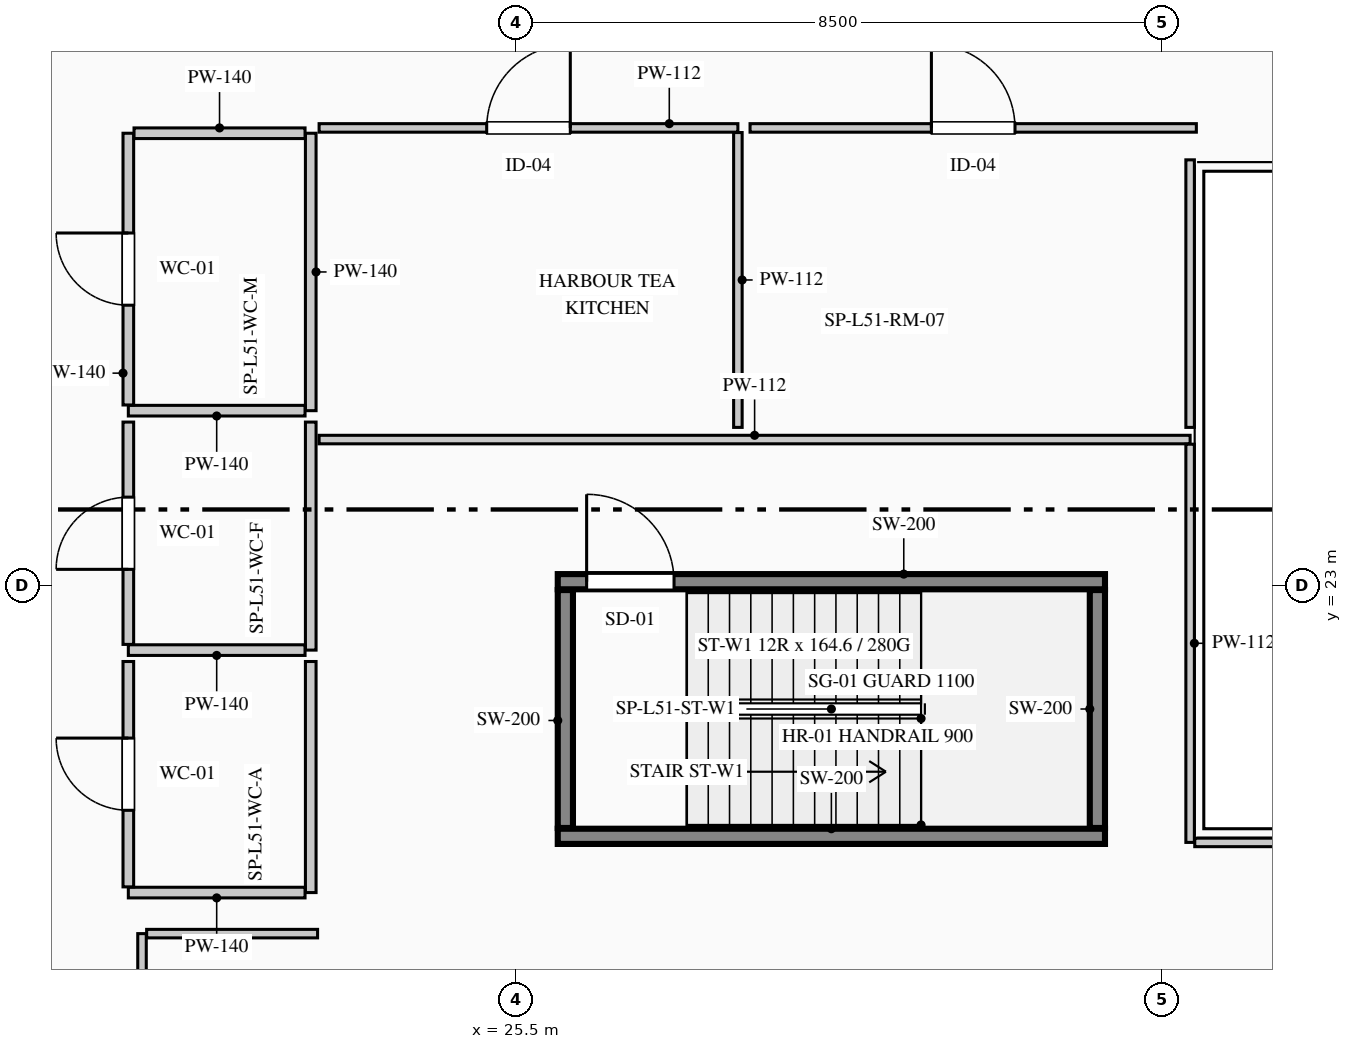
"""IFC4 building model, lengths in metres.
Left out: names, types, materials, properties, quantities, classifications, styles, units other than length and angle.
Written with IfcOpenShell. Run it as: python <this file> out.ifc"""

import sys

from ifc_helpers import new_model, si_unit, direction, frame, frame_2d, origin, place, context, subcontext, project, spatial, rectangle, extrude, element, fill, save


model = new_model("IFC4")
c1 = context("Model", 3, precision=1e-05, world=origin(), true_north=direction((0.0, 1.0)))
c2 = subcontext(c1, "Body", "Model", "MODEL_VIEW")
j1 = project(units=[si_unit("LENGTHUNIT", "METRE"), si_unit("PLANEANGLEUNIT", "RADIAN")], contexts=[c1])
p1 = place(None, origin())
s1 = spatial("IfcSite", under=j1, at=p1, CompositionType="ELEMENT")
p2 = place(p1, origin())
s2 = spatial("IfcBuilding", under=s1, at=p2, CompositionType="ELEMENT")
p3 = place(p2, frame((0.0, 0.0, 215.35)))
s3 = spatial("IfcBuildingStorey", under=s2, at=p3, CompositionType="ELEMENT", Elevation=215.35)
p4 = place(p3, frame((26.05, 19.7, 0.0), z_axis=(0.0, 0.0, 1.0), x_axis=(1.0, 0.0, 0.0)))
e1 = element("IfcWall", 1, at=p4, inside=s3, PredefinedType="SHEAR", context=c2, shape_type="SweptSolid", body=[
    extrude(rectangle(XDim=7.2, YDim=0.2, at=frame_2d((3.6, 0.0))), origin(), (0.0, 0.0, 1.0), 3.95),
])
p5 = place(p3, frame((26.05, 23.05, 0.0), z_axis=(0.0, 0.0, 1.0), x_axis=(1.0, 0.0, 0.0)))
e2 = element("IfcWall", 2, at=p5, inside=s3, PredefinedType="SHEAR", context=c2, shape_type="SweptSolid", body=[
    extrude(rectangle(XDim=7.2, YDim=0.2, at=frame_2d((3.6, 0.0))), origin(), (0.0, 0.0, 1.0), 3.95),
])
p6 = place(p5, frame((0.38, 0.0, 0.0)))
e3 = element("IfcOpeningElement", 3, at=p6, cuts=e2, PredefinedType="OPENING", context=c2, shape_type="SweptSolid", body=[
    extrude(rectangle(XDim=1.15, YDim=2.2, at=frame_2d((0.575, 1.1))), frame((0.0, 0.11, 0.0), z_axis=(0.0, -1.0, 0.0), x_axis=(1.0, 0.0, 0.0)), (0.0, 0.0, 1.0), 0.22),
])
for number, where, z_axis, x_axis in (
    (4, (26.15, 19.81, 0.0), (0.0, 0.0, 1.0), (0.0, 1.0, 0.0)),
    (5, (33.15, 19.81, 0.0), (0.0, 0.0, 1.0), (0.0, 1.0, 0.0)),
):
    element("IfcWall", number, at=place(p3, frame(where, z_axis=z_axis, x_axis=x_axis)), inside=s3, PredefinedType="SHEAR", context=c2, shape_type="SweptSolid", body=[
        extrude(rectangle(XDim=3.13, YDim=0.2, at=frame_2d((1.565, 0.0))), origin(), (0.0, 0.0, 1.0), 3.95),
    ])
p7 = place(p3, frame((22.8, 28.95, 0.0), z_axis=(0.0, 0.0, 1.0), x_axis=(0.0, -1.0, 0.0)))
e6 = element("IfcWall", 6, at=p7, inside=s3, PredefinedType="PARTITIONING", context=c2, shape_type="SweptSolid", body=[
    extrude(rectangle(XDim=3.65, YDim=0.14, at=frame_2d((1.825, 0.0))), origin(), (0.0, 0.0, 1.0), 3.325),
])
p8 = place(p3, frame((22.725, 25.3, 0.0), z_axis=(0.0, 0.0, 1.0), x_axis=(-1.0, 0.0, 0.0)))
e7 = element("IfcWall", 7, at=p8, inside=s3, PredefinedType="PARTITIONING", context=c2, shape_type="SweptSolid", body=[
    extrude(rectangle(XDim=2.325, YDim=0.14, at=frame_2d((1.163, 0.0))), origin(), (0.0, 0.0, 1.0), 3.7),
])
p9 = place(p3, frame((20.4, 25.375, 0.0), z_axis=(0.0, 0.0, 1.0), x_axis=(0.0, 1.0, 0.0)))
e8 = element("IfcWall", 8, at=p9, inside=s3, PredefinedType="PARTITIONING", context=c2, shape_type="SweptSolid", body=[
    extrude(rectangle(XDim=3.575, YDim=0.14, at=frame_2d((1.788, 0.0))), origin(), (0.0, 0.0, 1.0), 3.7),
])
p10 = place(p9, frame((1.312, 0.0, 0.0)))
e9 = element("IfcOpeningElement", 9, at=p10, cuts=e8, PredefinedType="OPENING", context=c2, shape_type="SweptSolid", body=[
    extrude(rectangle(XDim=0.95, YDim=2.15, at=frame_2d((0.475, 1.075))), frame((0.0, 0.08, 0.0), z_axis=(0.0, -1.0, 0.0), x_axis=(1.0, 0.0, 0.0)), (0.0, 0.0, 1.0), 0.16),
])
p11 = place(p3, frame((20.475, 28.95, 0.0), z_axis=(0.0, 0.0, 1.0), x_axis=(1.0, 0.0, 0.0)))
e10 = element("IfcWall", 10, at=p11, inside=s3, PredefinedType="PARTITIONING", context=c2, shape_type="SweptSolid", body=[
    extrude(rectangle(XDim=2.25, YDim=0.14, at=frame_2d((1.125, 0.0))), origin(), (0.0, 0.0, 1.0), 3.7),
])
p12 = place(p3, frame((22.8, 25.15, 0.0), z_axis=(0.0, 0.0, 1.0), x_axis=(0.0, -1.0, 0.0)))
e11 = element("IfcWall", 11, at=p12, inside=s3, PredefinedType="PARTITIONING", context=c2, shape_type="SweptSolid", body=[
    extrude(rectangle(XDim=3.0, YDim=0.14, at=frame_2d((1.5, 0.0))), origin(), (0.0, 0.0, 1.0), 3.325),
])
p13 = place(p3, frame((22.725, 22.15, 0.0), z_axis=(0.0, 0.0, 1.0), x_axis=(-1.0, 0.0, 0.0)))
e12 = element("IfcWall", 12, at=p13, inside=s3, PredefinedType="PARTITIONING", context=c2, shape_type="SweptSolid", body=[
    extrude(rectangle(XDim=2.325, YDim=0.14, at=frame_2d((1.163, 0.0))), origin(), (0.0, 0.0, 1.0), 3.7),
])
p14 = place(p3, frame((20.4, 22.225, 0.0), z_axis=(0.0, 0.0, 1.0), x_axis=(0.0, 1.0, 0.0)))
e13 = element("IfcWall", 13, at=p14, inside=s3, PredefinedType="PARTITIONING", context=c2, shape_type="SweptSolid", body=[
    extrude(rectangle(XDim=2.925, YDim=0.14, at=frame_2d((1.462, 0.0))), origin(), (0.0, 0.0, 1.0), 3.7),
])
p15 = place(p14, frame((0.988, 0.0, 0.0)))
e14 = element("IfcOpeningElement", 14, at=p15, cuts=e13, PredefinedType="OPENING", context=c2, shape_type="SweptSolid", body=[
    extrude(rectangle(XDim=0.95, YDim=2.15, at=frame_2d((0.475, 1.075))), frame((0.0, 0.08, 0.0), z_axis=(0.0, -1.0, 0.0), x_axis=(1.0, 0.0, 0.0)), (0.0, 0.0, 1.0), 0.16),
])
p16 = place(p3, frame((22.8, 22.0, 0.0), z_axis=(0.0, 0.0, 1.0), x_axis=(0.0, -1.0, 0.0)))
e15 = element("IfcWall", 15, at=p16, inside=s3, PredefinedType="PARTITIONING", context=c2, shape_type="SweptSolid", body=[
    extrude(rectangle(XDim=3.04, YDim=0.14, at=frame_2d((1.52, 0.0))), origin(), (0.0, 0.0, 1.0), 3.325),
])
p17 = place(p3, frame((22.725, 18.96, 0.0), z_axis=(0.0, 0.0, 1.0), x_axis=(-1.0, 0.0, 0.0)))
e16 = element("IfcWall", 16, at=p17, inside=s3, PredefinedType="PARTITIONING", context=c2, shape_type="SweptSolid", body=[
    extrude(rectangle(XDim=2.325, YDim=0.14, at=frame_2d((1.163, 0.0))), origin(), (0.0, 0.0, 1.0), 3.7),
])
p18 = place(p3, frame((20.4, 19.035, 0.0), z_axis=(0.0, 0.0, 1.0), x_axis=(0.0, 1.0, 0.0)))
e17 = element("IfcWall", 17, at=p18, inside=s3, PredefinedType="PARTITIONING", context=c2, shape_type="SweptSolid", body=[
    extrude(rectangle(XDim=2.965, YDim=0.14, at=frame_2d((1.482, 0.0))), origin(), (0.0, 0.0, 1.0), 3.7),
])
p19 = place(p18, frame((1.008, 0.0, 0.0)))
e18 = element("IfcOpeningElement", 18, at=p19, cuts=e17, PredefinedType="OPENING", context=c2, shape_type="SweptSolid", body=[
    extrude(rectangle(XDim=0.95, YDim=2.15, at=frame_2d((0.475, 1.075))), frame((0.0, 0.08, 0.0), z_axis=(0.0, -1.0, 0.0), x_axis=(1.0, 0.0, 0.0)), (0.0, 0.0, 1.0), 0.16),
])
p20 = place(p3, frame((20.58, 12.861, 0.0), z_axis=(0.0, 0.0, 1.0), x_axis=(0.0, 1.0, 0.0)))
e19 = element("IfcWall", 19, at=p20, inside=s3, PredefinedType="PARTITIONING", context=c2, shape_type="SweptSolid", body=[
    extrude(rectangle(XDim=5.559, YDim=0.112, at=frame_2d((2.779, 0.0))), origin(), (0.0, 0.0, 1.0), 3.7),
])
p21 = place(p20, frame((2.229, 0.0, 0.0)))
e20 = element("IfcOpeningElement", 20, at=p21, cuts=e19, PredefinedType="OPENING", context=c2, shape_type="SweptSolid", body=[
    extrude(rectangle(XDim=1.1, YDim=2.2, at=frame_2d((0.55, 1.1))), frame((0.0, 0.066, 0.0), z_axis=(0.0, -1.0, 0.0), x_axis=(1.0, 0.0, 0.0)), (0.0, 0.0, 1.0), 0.132),
])
p22 = place(p3, frame((20.641, 18.42, 0.0), z_axis=(0.0, 0.0, 1.0), x_axis=(1.0, 0.0, 0.0)))
e21 = element("IfcWall", 21, at=p22, inside=s3, PredefinedType="PARTITIONING", context=c2, shape_type="SweptSolid", body=[
    extrude(rectangle(XDim=2.249, YDim=0.112, at=frame_2d((1.125, 0.0))), origin(), (0.0, 0.0, 1.0), 3.7),
])
p23 = place(p3, frame((22.91, 24.92, 0.0), z_axis=(0.0, 0.0, 1.0), x_axis=(1.0, 0.0, 0.0)))
e22 = element("IfcWall", 22, at=p23, inside=s3, PredefinedType="PARTITIONING", context=c2, shape_type="SweptSolid", body=[
    extrude(rectangle(XDim=11.46, YDim=0.112, at=frame_2d((5.73, 0.0))), origin(), (0.0, 0.0, 1.0), 3.325),
])
p24 = place(p3, frame((34.37, 24.859, 0.0), z_axis=(0.0, 0.0, 1.0), x_axis=(0.0, -1.0, 0.0)))
e23 = element("IfcWall", 23, at=p24, inside=s3, PredefinedType="PARTITIONING", context=c2, shape_type="SweptSolid", body=[
    extrude(rectangle(XDim=5.239, YDim=0.112, at=frame_2d((2.619, 0.0))), origin(), (0.0, 0.0, 1.0), 3.7),
])
p25 = place(p3, frame((34.431, 19.62, 0.0), z_axis=(0.0, 0.0, 1.0), x_axis=(1.0, 0.0, 0.0)))
e24 = element("IfcWall", 24, at=p25, inside=s3, PredefinedType="PARTITIONING", context=c2, shape_type="SweptSolid", body=[
    extrude(rectangle(XDim=2.989, YDim=0.112, at=frame_2d((1.495, 0.0))), origin(), (0.0, 0.0, 1.0), 3.7),
])
p26 = place(p3, frame((22.91, 29.02, 0.0), z_axis=(0.0, 0.0, 1.0), x_axis=(1.0, 0.0, 0.0)))
e25 = element("IfcWall", 25, at=p26, inside=s3, PredefinedType="PARTITIONING", context=c2, shape_type="SweptSolid", body=[
    extrude(rectangle(XDim=5.51, YDim=0.112, at=frame_2d((2.755, 0.0))), origin(), (0.0, 0.0, 1.0), 3.485),
])
p27 = place(p26, frame((2.205, 0.0, 0.0)))
e26 = element("IfcOpeningElement", 26, at=p27, cuts=e25, PredefinedType="OPENING", context=c2, shape_type="SweptSolid", body=[
    extrude(rectangle(XDim=1.1, YDim=2.2, at=frame_2d((0.55, 1.1))), frame((0.0, 0.066, 0.0), z_axis=(0.0, -1.0, 0.0), x_axis=(1.0, 0.0, 0.0)), (0.0, 0.0, 1.0), 0.132),
])
p28 = place(p3, frame((28.42, 28.959, 0.0), z_axis=(0.0, 0.0, 1.0), x_axis=(0.0, -1.0, 0.0)))
e27 = element("IfcWall", 27, at=p28, inside=s3, PredefinedType="PARTITIONING", context=c2, shape_type="SweptSolid", body=[
    extrude(rectangle(XDim=3.879, YDim=0.112, at=frame_2d((1.939, 0.0))), origin(), (0.0, 0.0, 1.0), 3.7),
])
p29 = place(p3, frame((34.37, 28.6, 0.0), z_axis=(0.0, 0.0, 1.0), x_axis=(0.0, -1.0, 0.0)))
e28 = element("IfcWall", 28, at=p29, inside=s3, PredefinedType="PARTITIONING", context=c2, shape_type="SweptSolid", body=[
    extrude(rectangle(XDim=3.52, YDim=0.112, at=frame_2d((1.76, 0.0))), origin(), (0.0, 0.0, 1.0), 3.7),
])
p30 = place(p3, frame((28.58, 29.02, 0.0), z_axis=(0.0, 0.0, 1.0), x_axis=(1.0, 0.0, 0.0)))
e29 = element("IfcWall", 29, at=p30, inside=s3, PredefinedType="PARTITIONING", context=c2, shape_type="SweptSolid", body=[
    extrude(rectangle(XDim=5.872, YDim=0.112, at=frame_2d((2.936, 0.0))), origin(), (0.0, 0.0, 1.0), 3.485),
])
p31 = place(p30, frame((2.386, 0.0, 0.0)))
e30 = element("IfcOpeningElement", 30, at=p31, cuts=e29, PredefinedType="OPENING", context=c2, shape_type="SweptSolid", body=[
    extrude(rectangle(XDim=1.1, YDim=2.2, at=frame_2d((0.55, 1.1))), frame((0.0, 0.066, 0.0), z_axis=(0.0, -1.0, 0.0), x_axis=(1.0, 0.0, 0.0)), (0.0, 0.0, 1.0), 0.132),
])
p32 = place(p6, origin())
e31 = element("IfcDoor", 31, at=p32, inside=s3, OperationType="SINGLE_SWING_LEFT", PredefinedType="DOOR", context=c2, shape_type="SweptSolid", body=[
    extrude(rectangle(XDim=1.15, YDim=2.2, at=frame_2d((0.575, 1.1))), frame((0.0, 0.025, 0.0), z_axis=(0.0, -1.0, 0.0), x_axis=(1.0, 0.0, 0.0)), (0.0, 0.0, 1.0), 0.05),
])
fill(e3, e31)
p33 = place(p10, origin())
e32 = element("IfcDoor", 32, at=p33, inside=s3, OperationType="SINGLE_SWING_RIGHT", PredefinedType="DOOR", context=c2, shape_type="SweptSolid", body=[
    extrude(rectangle(XDim=0.95, YDim=2.15, at=frame_2d((0.475, 1.075))), frame((0.0, 0.025, 0.0), z_axis=(0.0, -1.0, 0.0), x_axis=(1.0, 0.0, 0.0)), (0.0, 0.0, 1.0), 0.05),
])
fill(e9, e32)
p34 = place(p15, origin())
e33 = element("IfcDoor", 33, at=p34, inside=s3, OperationType="SINGLE_SWING_LEFT", PredefinedType="DOOR", context=c2, shape_type="SweptSolid", body=[
    extrude(rectangle(XDim=0.95, YDim=2.15, at=frame_2d((0.475, 1.075))), frame((0.0, 0.025, 0.0), z_axis=(0.0, -1.0, 0.0), x_axis=(1.0, 0.0, 0.0)), (0.0, 0.0, 1.0), 0.05),
])
fill(e14, e33)
p35 = place(p19, origin())
e34 = element("IfcDoor", 34, at=p35, inside=s3, OperationType="SINGLE_SWING_RIGHT", PredefinedType="DOOR", context=c2, shape_type="SweptSolid", body=[
    extrude(rectangle(XDim=0.95, YDim=2.15, at=frame_2d((0.475, 1.075))), frame((0.0, 0.025, 0.0), z_axis=(0.0, -1.0, 0.0), x_axis=(1.0, 0.0, 0.0)), (0.0, 0.0, 1.0), 0.05),
])
fill(e18, e34)
p36 = place(p27, origin())
e35 = element("IfcDoor", 35, at=p36, inside=s3, OperationType="SINGLE_SWING_RIGHT", PredefinedType="DOOR", context=c2, shape_type="SweptSolid", body=[
    extrude(rectangle(XDim=1.1, YDim=2.2, at=frame_2d((0.55, 1.1))), frame((0.0, 0.025, 0.0), z_axis=(0.0, -1.0, 0.0), x_axis=(1.0, 0.0, 0.0)), (0.0, 0.0, 1.0), 0.05),
])
fill(e26, e35)
p37 = place(p31, origin())
e36 = element("IfcDoor", 36, at=p37, inside=s3, OperationType="SINGLE_SWING_LEFT", PredefinedType="DOOR", context=c2, shape_type="SweptSolid", body=[
    extrude(rectangle(XDim=1.1, YDim=2.2, at=frame_2d((0.55, 1.1))), frame((0.0, 0.025, 0.0), z_axis=(0.0, -1.0, 0.0), x_axis=(1.0, 0.0, 0.0)), (0.0, 0.0, 1.0), 0.05),
])
fill(e30, e36)
save(model, sys.argv[1])
